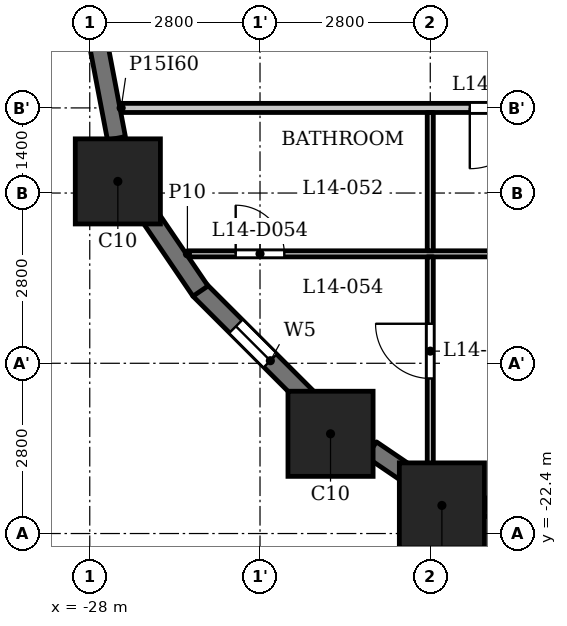
"""IFC4 building model, lengths in metres.
Left out: names, types, materials, properties, quantities, classifications, styles, units other than length and angle.
Written with IfcOpenShell. Run it as: python <this file> out.ifc"""

import sys

from ifc_helpers import new_model, si_unit, direction, frame, frame_2d, origin, origin_2d, place, context, subcontext, project, spatial, rectangle, extrude, element, fill, save


model = new_model("IFC4")
c1 = context("Model", 3, precision=1e-05, world=origin(), true_north=direction((0.0, 1.0)))
c2 = subcontext(c1, "Body", "Model", "MODEL_VIEW")
j1 = project(units=[si_unit("LENGTHUNIT", "METRE"), si_unit("PLANEANGLEUNIT", "RADIAN")], contexts=[c1])
p1 = place(None, origin())
s1 = spatial("IfcSite", under=j1, at=p1, CompositionType="ELEMENT")
p2 = place(p1, origin())
s2 = spatial("IfcBuilding", under=s1, at=p2, CompositionType="ELEMENT")
p3 = place(p2, frame((0.0, 0.0, 58.5)))
s3 = spatial("IfcBuildingStorey", under=s2, at=p3, CompositionType="ELEMENT", Elevation=58.5)
for number, where, z_axis, x_axis in (
    (1, (-22.209, -21.938, 0.0), (0.0, 0.0, 1.0), (1.0, 0.0, 0.0)),
    (2, (-27.538, -16.609, 0.0), (0.0, 0.0, 1.0), (1.0, 0.0, 0.0)),
    (3, (-24.04, -20.76, 0.0), (0.0, 0.0, 1.0), (1.0, 0.0, 0.0)),
):
    element("IfcColumn", number, at=place(p3, frame(where, z_axis=z_axis, x_axis=x_axis)), inside=s3, PredefinedType="COLUMN", context=c2, shape_type="SweptSolid", body=[
        extrude(rectangle(XDim=1.4, YDim=1.4, at=origin_2d()), origin(), (0.0, 0.0, 1.0), 3.5),
    ])
p4 = place(p3, frame((-26.197, -18.391, 0.0), z_axis=(0.0, 0.0, 1.0), x_axis=(0.707057949532, -0.707155609469, 0.0)))
e4 = element("IfcWall", 4, at=p4, inside=s3, PredefinedType="SOLIDWALL", context=c2, shape_type="SweptSolid", body=[
    extrude(rectangle(XDim=2.5, YDim=0.3, at=frame_2d((1.25, 0.0))), origin(), (0.0, 0.0, 1.0), 2.35),
])
p5 = place(p4, frame((0.85, 0.0, 0.6)))
e5 = element("IfcOpeningElement", 5, at=p5, cuts=e4, PredefinedType="OPENING", context=c2, shape_type="SweptSolid", body=[
    extrude(rectangle(XDim=0.8, YDim=1.55, at=frame_2d((0.4, 0.775))), frame((0.0, 0.16, 0.0), z_axis=(0.0, -1.0, 0.0), x_axis=(1.0, 0.0, 0.0)), (0.0, 0.0, 1.0), 0.32),
])
p6 = place(p3, frame((-23.368, -21.017, 0.0), z_axis=(0.0, 0.0, 1.0), x_axis=(0.827037530089, -0.562146710232, 0.0)))
e6 = element("IfcWall", 6, at=p6, inside=s3, PredefinedType="SOLIDWALL", context=c2, shape_type="SweptSolid", body=[
    extrude(rectangle(XDim=0.777, YDim=0.3, at=frame_2d((0.388, 0.0))), origin(), (0.0, 0.0, 1.0), 3.2),
])
for number, where, z_axis, x_axis in (
    (7, (-21.5, -21.961, 0.0), (0.0, 0.0, 1.0), (0.982, -0.187, 0.0)),
    (8, (-27.853, -14.372, 0.0), (0.0, 0.0, 1.0), (0.187, -0.982, 0.0)),
    (9, (-27.053, -17.126, 0.0), (0.0, 0.0, 1.0), (0.562, -0.827, 0.0)),
):
    element("IfcWall", number, at=place(p3, frame(where, z_axis=z_axis, x_axis=x_axis)), inside=s3, PredefinedType="SOLIDWALL", context=c2, shape_type="SweptSolid", body=[
        extrude(rectangle(XDim=1.556, YDim=0.3, at=frame_2d((0.778, 0.0))), origin(), (0.0, 0.0, 1.0), 2.35),
    ])
p7 = place(p3, frame((-26.394, -17.8, 0.0), z_axis=(0.0, 0.0, 1.0), x_axis=(1.0, 0.0, 0.0)))
e10 = element("IfcWall", 10, at=p7, inside=s3, PredefinedType="PARTITIONING", context=c2, shape_type="SweptSolid", body=[
    extrude(rectangle(XDim=53.034, YDim=0.1, at=frame_2d((26.517, 0.0))), origin(), (0.0, 0.0, 1.0), 3.2),
])
p8 = place(p7, frame((0.794, 0.0, 0.0)))
e11 = element("IfcOpeningElement", 11, at=p8, cuts=e10, PredefinedType="OPENING", context=c2, shape_type="SweptSolid", body=[
    extrude(rectangle(XDim=0.8, YDim=2.1, at=frame_2d((0.4, 1.05))), frame((0.0, 0.06, 0.0), z_axis=(0.0, -1.0, 0.0), x_axis=(1.0, 0.0, 0.0)), (0.0, 0.0, 1.0), 0.12),
])
p9 = place(p7, frame((5.644, 0.0, 0.0)))
e12 = element("IfcOpeningElement", 12, at=p9, cuts=e10, PredefinedType="OPENING", context=c2, shape_type="SweptSolid", body=[
    extrude(rectangle(XDim=0.9, YDim=2.1, at=frame_2d((0.45, 1.05))), frame((0.0, 0.06, 0.0), z_axis=(0.0, -1.0, 0.0), x_axis=(1.0, 0.0, 0.0)), (0.0, 0.0, 1.0), 0.12),
])
p10 = place(p7, frame((19.344, 0.0, 0.0)))
e13 = element("IfcOpeningElement", 13, at=p10, cuts=e10, PredefinedType="OPENING", context=c2, shape_type="SweptSolid", body=[
    extrude(rectangle(XDim=0.8, YDim=2.1, at=frame_2d((0.4, 1.05))), frame((0.0, 0.06, 0.0), z_axis=(0.0, -1.0, 0.0), x_axis=(1.0, 0.0, 0.0)), (0.0, 0.0, 1.0), 0.12),
])
p11 = place(p7, frame((17.094, 0.0, 0.0)))
e14 = element("IfcOpeningElement", 14, at=p11, cuts=e10, PredefinedType="OPENING", context=c2, shape_type="SweptSolid", body=[
    extrude(rectangle(XDim=0.9, YDim=2.1, at=frame_2d((0.45, 1.05))), frame((0.0, 0.06, 0.0), z_axis=(0.0, -1.0, 0.0), x_axis=(1.0, 0.0, 0.0)), (0.0, 0.0, 1.0), 0.12),
])
p12 = place(p7, frame((10.494, 0.0, 0.0)))
e15 = element("IfcOpeningElement", 15, at=p12, cuts=e10, PredefinedType="OPENING", context=c2, shape_type="SweptSolid", body=[
    extrude(rectangle(XDim=0.9, YDim=2.1, at=frame_2d((0.45, 1.05))), frame((0.0, 0.06, 0.0), z_axis=(0.0, -1.0, 0.0), x_axis=(1.0, 0.0, 0.0)), (0.0, 0.0, 1.0), 0.12),
])
p13 = place(p7, frame((13.294, 0.0, 0.0)))
e16 = element("IfcOpeningElement", 16, at=p13, cuts=e10, PredefinedType="OPENING", context=c2, shape_type="SweptSolid", body=[
    extrude(rectangle(XDim=0.9, YDim=2.1, at=frame_2d((0.45, 1.05))), frame((0.0, 0.06, 0.0), z_axis=(0.0, -1.0, 0.0), x_axis=(1.0, 0.0, 0.0)), (0.0, 0.0, 1.0), 0.12),
])
p14 = place(p7, frame((27.044, 0.0, 0.0)))
e17 = element("IfcOpeningElement", 17, at=p14, cuts=e10, PredefinedType="OPENING", context=c2, shape_type="SweptSolid", body=[
    extrude(rectangle(XDim=0.8, YDim=2.1, at=frame_2d((0.4, 1.05))), frame((0.0, 0.06, 0.0), z_axis=(0.0, -1.0, 0.0), x_axis=(1.0, 0.0, 0.0)), (0.0, 0.0, 1.0), 0.12),
])
p15 = place(p7, frame((22.444, 0.0, 0.0)))
e18 = element("IfcOpeningElement", 18, at=p15, cuts=e10, PredefinedType="OPENING", context=c2, shape_type="SweptSolid", body=[
    extrude(rectangle(XDim=0.9, YDim=2.1, at=frame_2d((0.45, 1.05))), frame((0.0, 0.06, 0.0), z_axis=(0.0, -1.0, 0.0), x_axis=(1.0, 0.0, 0.0)), (0.0, 0.0, 1.0), 0.12),
])
p16 = place(p7, frame((36.144, 0.0, 0.0)))
e19 = element("IfcOpeningElement", 19, at=p16, cuts=e10, PredefinedType="OPENING", context=c2, shape_type="SweptSolid", body=[
    extrude(rectangle(XDim=0.8, YDim=2.1, at=frame_2d((0.4, 1.05))), frame((0.0, 0.06, 0.0), z_axis=(0.0, -1.0, 0.0), x_axis=(1.0, 0.0, 0.0)), (0.0, 0.0, 1.0), 0.12),
])
p17 = place(p7, frame((33.644, 0.0, 0.0)))
e20 = element("IfcOpeningElement", 20, at=p17, cuts=e10, PredefinedType="OPENING", context=c2, shape_type="SweptSolid", body=[
    extrude(rectangle(XDim=0.9, YDim=2.1, at=frame_2d((0.45, 1.05))), frame((0.0, 0.06, 0.0), z_axis=(0.0, -1.0, 0.0), x_axis=(1.0, 0.0, 0.0)), (0.0, 0.0, 1.0), 0.12),
])
p18 = place(p7, frame((39.144, 0.0, 0.0)))
e21 = element("IfcOpeningElement", 21, at=p18, cuts=e10, PredefinedType="OPENING", context=c2, shape_type="SweptSolid", body=[
    extrude(rectangle(XDim=0.8, YDim=2.1, at=frame_2d((0.4, 1.05))), frame((0.0, 0.06, 0.0), z_axis=(0.0, -1.0, 0.0), x_axis=(1.0, 0.0, 0.0)), (0.0, 0.0, 1.0), 0.12),
])
p19 = place(p7, frame((41.494, 0.0, 0.0)))
e22 = element("IfcOpeningElement", 22, at=p19, cuts=e10, PredefinedType="OPENING", context=c2, shape_type="SweptSolid", body=[
    extrude(rectangle(XDim=0.9, YDim=2.1, at=frame_2d((0.45, 1.05))), frame((0.0, 0.06, 0.0), z_axis=(0.0, -1.0, 0.0), x_axis=(1.0, 0.0, 0.0)), (0.0, 0.0, 1.0), 0.12),
])
p20 = place(p7, frame((49.362, 0.0, 0.0)))
e23 = element("IfcOpeningElement", 23, at=p20, cuts=e10, PredefinedType="OPENING", context=c2, shape_type="SweptSolid", body=[
    extrude(rectangle(XDim=0.8, YDim=2.1, at=frame_2d((0.4, 1.05))), frame((0.0, 0.06, 0.0), z_axis=(0.0, -1.0, 0.0), x_axis=(1.0, 0.0, 0.0)), (0.0, 0.0, 1.0), 0.12),
])
p21 = place(p7, frame((45.094, 0.0, 0.0)))
e24 = element("IfcOpeningElement", 24, at=p21, cuts=e10, PredefinedType="OPENING", context=c2, shape_type="SweptSolid", body=[
    extrude(rectangle(XDim=0.9, YDim=2.1, at=frame_2d((0.45, 1.05))), frame((0.0, 0.06, 0.0), z_axis=(0.0, -1.0, 0.0), x_axis=(1.0, 0.0, 0.0)), (0.0, 0.0, 1.0), 0.12),
])
p22 = place(p3, frame((-27.484, -15.4, 0.0), z_axis=(0.0, 0.0, 1.0), x_axis=(1.0, 0.0, 0.0)))
e25 = element("IfcWall", 25, at=p22, inside=s3, PredefinedType="PARTITIONING", context=c2, shape_type="SweptSolid", body=[
    extrude(rectangle(XDim=54.968, YDim=0.15, at=frame_2d((27.484, 0.0))), origin(), (0.0, 0.0, 1.0), 3.2),
])
p23 = place(p22, frame((5.734, 0.0, 0.0)))
e26 = element("IfcOpeningElement", 26, at=p23, cuts=e25, PredefinedType="OPENING", context=c2, shape_type="SweptSolid", body=[
    extrude(rectangle(XDim=1.0, YDim=2.1, at=frame_2d((0.5, 1.05))), frame((0.0, 0.085, 0.0), z_axis=(0.0, -1.0, 0.0), x_axis=(1.0, 0.0, 0.0)), (0.0, 0.0, 1.0), 0.17),
])
p24 = place(p22, frame((11.584, 0.0, 0.0)))
e27 = element("IfcOpeningElement", 27, at=p24, cuts=e25, PredefinedType="OPENING", context=c2, shape_type="SweptSolid", body=[
    extrude(rectangle(XDim=1.0, YDim=2.1, at=frame_2d((0.5, 1.05))), frame((0.0, 0.085, 0.0), z_axis=(0.0, -1.0, 0.0), x_axis=(1.0, 0.0, 0.0)), (0.0, 0.0, 1.0), 0.17),
])
p25 = place(p22, frame((22.534, 0.0, 0.0)))
e28 = element("IfcOpeningElement", 28, at=p25, cuts=e25, PredefinedType="OPENING", context=c2, shape_type="SweptSolid", body=[
    extrude(rectangle(XDim=1.0, YDim=2.1, at=frame_2d((0.5, 1.05))), frame((0.0, 0.085, 0.0), z_axis=(0.0, -1.0, 0.0), x_axis=(1.0, 0.0, 0.0)), (0.0, 0.0, 1.0), 0.17),
])
p26 = place(p22, frame((33.734, 0.0, 0.0)))
e29 = element("IfcOpeningElement", 29, at=p26, cuts=e25, PredefinedType="OPENING", context=c2, shape_type="SweptSolid", body=[
    extrude(rectangle(XDim=1.0, YDim=2.1, at=frame_2d((0.5, 1.05))), frame((0.0, 0.085, 0.0), z_axis=(0.0, -1.0, 0.0), x_axis=(1.0, 0.0, 0.0)), (0.0, 0.0, 1.0), 0.17),
])
p27 = place(p22, frame((42.334, 0.0, 0.0)))
e30 = element("IfcOpeningElement", 30, at=p27, cuts=e25, PredefinedType="OPENING", context=c2, shape_type="SweptSolid", body=[
    extrude(rectangle(XDim=1.0, YDim=2.1, at=frame_2d((0.5, 1.05))), frame((0.0, 0.085, 0.0), z_axis=(0.0, -1.0, 0.0), x_axis=(1.0, 0.0, 0.0)), (0.0, 0.0, 1.0), 0.17),
])
p28 = place(p22, frame((45.184, 0.0, 0.0)))
e31 = element("IfcOpeningElement", 31, at=p28, cuts=e25, PredefinedType="OPENING", context=c2, shape_type="SweptSolid", body=[
    extrude(rectangle(XDim=1.0, YDim=2.1, at=frame_2d((0.5, 1.05))), frame((0.0, 0.085, 0.0), z_axis=(0.0, -1.0, 0.0), x_axis=(1.0, 0.0, 0.0)), (0.0, 0.0, 1.0), 0.17),
])
p29 = place(p3, frame((-22.4, -21.72, 0.0), z_axis=(0.0, 0.0, 1.0), x_axis=(0.0, 1.0, 0.0)))
e32 = element("IfcWall", 32, at=p29, inside=s3, PredefinedType="PARTITIONING", context=c2, shape_type="SweptSolid", body=[
    extrude(rectangle(XDim=3.87, YDim=0.1, at=frame_2d((1.935, 0.0))), origin(), (0.0, 0.0, 1.0), 3.2),
])
p30 = place(p29, frame((1.87, 0.0, 0.0)))
e33 = element("IfcOpeningElement", 33, at=p30, cuts=e32, PredefinedType="OPENING", context=c2, shape_type="SweptSolid", body=[
    extrude(rectangle(XDim=0.9, YDim=2.1, at=frame_2d((0.45, 1.05))), frame((0.0, 0.06, 0.0), z_axis=(0.0, -1.0, 0.0), x_axis=(1.0, 0.0, 0.0)), (0.0, 0.0, 1.0), 0.12),
])
p31 = place(p3, frame((-22.4, -17.75, 0.0), z_axis=(0.0, 0.0, 1.0), x_axis=(0.0, 1.0, 0.0)))
e34 = element("IfcWall", 34, at=p31, inside=s3, PredefinedType="PARTITIONING", context=c2, shape_type="SweptSolid", body=[
    extrude(rectangle(XDim=2.275, YDim=0.1, at=frame_2d((1.137, 0.0))), origin(), (0.0, 0.0, 1.0), 3.2),
])
p32 = place(p23, origin())
e35 = element("IfcDoor", 35, at=p32, inside=s3, OperationType="SINGLE_SWING_LEFT", PredefinedType="DOOR", context=c2, shape_type="SweptSolid", body=[
    extrude(rectangle(XDim=1.0, YDim=2.1, at=frame_2d((0.5, 1.05))), frame((0.0, 0.025, 0.0), z_axis=(0.0, -1.0, 0.0), x_axis=(1.0, 0.0, 0.0)), (0.0, 0.0, 1.0), 0.05),
])
fill(e26, e35)
p33 = place(p8, origin())
e36 = element("IfcDoor", 36, at=p33, inside=s3, OperationType="SINGLE_SWING_RIGHT", PredefinedType="DOOR", context=c2, shape_type="SweptSolid", body=[
    extrude(rectangle(XDim=0.8, YDim=2.1, at=frame_2d((0.4, 1.05))), frame((0.0, 0.025, 0.0), z_axis=(0.0, -1.0, 0.0), x_axis=(1.0, 0.0, 0.0)), (0.0, 0.0, 1.0), 0.05),
])
fill(e11, e36)
p34 = place(p30, origin())
e37 = element("IfcDoor", 37, at=p34, inside=s3, OperationType="SINGLE_SWING_LEFT", PredefinedType="DOOR", context=c2, shape_type="SweptSolid", body=[
    extrude(rectangle(XDim=0.9, YDim=2.1, at=frame_2d((0.45, 1.05))), frame((0.0, 0.025, 0.0), z_axis=(0.0, -1.0, 0.0), x_axis=(1.0, 0.0, 0.0)), (0.0, 0.0, 1.0), 0.05),
])
fill(e33, e37)
p35 = place(p5, origin())
e38 = element("IfcWindow", 38, at=p35, inside=s3, PartitioningType="SINGLE_PANEL", PredefinedType="WINDOW", context=c2, shape_type="SweptSolid", body=[
    extrude(rectangle(XDim=0.8, YDim=1.55, at=frame_2d((0.4, 0.775))), frame((0.0, 0.03, 0.0), z_axis=(0.0, -1.0, 0.0), x_axis=(1.0, 0.0, 0.0)), (0.0, 0.0, 1.0), 0.06),
])
fill(e5, e38)
save(model, sys.argv[1])
